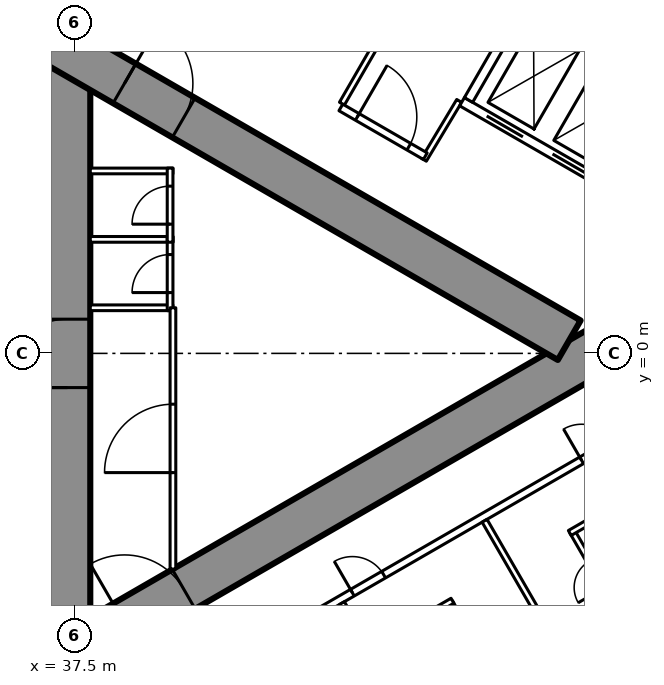
"""IFC4 building model, lengths in metres.
Left out: names, types, materials, properties, quantities, classifications, styles, units other than length and angle.
Written with IfcOpenShell. Run it as: python <this file> out.ifc"""

import sys

from ifc_helpers import new_model, si_unit, direction, frame, frame_2d, origin, place, context, subcontext, project, spatial, rectangle, extrude, element, fill, save


model = new_model("IFC4")
c1 = context("Model", 3, precision=1e-05, world=origin(), true_north=direction((0.0, 1.0)))
c2 = subcontext(c1, "Body", "Model", "MODEL_VIEW")
j1 = project(units=[si_unit("LENGTHUNIT", "METRE"), si_unit("PLANEANGLEUNIT", "RADIAN")], contexts=[c1])
p1 = place(None, origin())
s1 = spatial("IfcSite", under=j1, at=p1, CompositionType="ELEMENT")
p2 = place(p1, origin())
s2 = spatial("IfcBuilding", under=s1, at=p2, CompositionType="ELEMENT")
p3 = place(p2, frame((0.0, 0.0, 198.3)))
s3 = spatial("IfcBuildingStorey", under=s2, at=p3, CompositionType="ELEMENT", Elevation=198.3)
p4 = place(p3, frame((37.3, -8.6, 0.0), z_axis=(0.0, 0.0, 1.0), x_axis=(0.0, 1.0, 0.0)))
e1 = element("IfcWall", 1, at=p4, inside=s3, PredefinedType="SHEAR", context=c2, shape_type="SweptSolid", body=[
    extrude(rectangle(XDim=17.2, YDim=1.2, at=frame_2d((8.6, 0.0))), origin(), (0.0, 0.0, 1.0), 3.5),
])
p5 = place(p4, frame((7.7, 0.0, 0.0)))
e2 = element("IfcOpeningElement", 2, at=p5, cuts=e1, PredefinedType="OPENING", context=c2, shape_type="SweptSolid", body=[
    extrude(rectangle(XDim=1.8, YDim=2.2, at=frame_2d((0.9, 1.1))), frame((0.0, 0.61, 0.0), z_axis=(0.0, -1.0, 0.0), x_axis=(1.0, 0.0, 0.0)), (0.0, 0.0, 1.0), 1.22),
])
p6 = place(p3, frame((27.2, -13.8, 0.0), z_axis=(0.0, 0.0, 1.0), x_axis=(0.866027159892, 0.499996958321, 0.0)))
e3 = element("IfcWall", 3, at=p6, inside=s3, PredefinedType="SHEAR", context=c2, shape_type="SweptSolid", body=[
    extrude(rectangle(XDim=27.947, YDim=1.2, at=frame_2d((13.973, 0.0))), origin(), (0.0, 0.0, 1.0), 3.5),
])
p7 = place(p6, frame((4.6, 0.0, 0.0)))
e4 = element("IfcOpeningElement", 4, at=p7, cuts=e3, PredefinedType="OPENING", context=c2, shape_type="SweptSolid", body=[
    extrude(rectangle(XDim=1.0, YDim=2.2, at=frame_2d((0.5, 1.1))), frame((0.0, 0.61, 0.0), z_axis=(0.0, -1.0, 0.0), x_axis=(1.0, 0.0, 0.0)), (0.0, 0.0, 1.0), 1.22),
])
p8 = place(p6, frame((13.395, 0.0, 0.0)))
e5 = element("IfcOpeningElement", 5, at=p8, cuts=e3, PredefinedType="OPENING", context=c2, shape_type="SweptSolid", body=[
    extrude(rectangle(XDim=1.8, YDim=2.2, at=frame_2d((0.9, 1.1))), frame((0.0, 0.61, 0.0), z_axis=(0.0, -1.0, 0.0), x_axis=(1.0, 0.0, 0.0)), (0.0, 0.0, 1.0), 1.22),
])
p9 = place(p3, frame((27.2, 13.8, 0.0), z_axis=(0.0, 0.0, 1.0), x_axis=(0.866024515034, -0.500001539357, 0.0)))
e6 = element("IfcWall", 6, at=p9, inside=s3, PredefinedType="SHEAR", context=c2, shape_type="SweptSolid", body=[
    extrude(rectangle(XDim=26.907, YDim=1.2, at=frame_2d((13.454, 0.0))), origin(), (0.0, 0.0, 1.0), 3.5),
])
p10 = place(p9, frame((4.6, 0.0, 0.0)))
e7 = element("IfcOpeningElement", 7, at=p10, cuts=e6, PredefinedType="OPENING", context=c2, shape_type="SweptSolid", body=[
    extrude(rectangle(XDim=1.0, YDim=2.2, at=frame_2d((0.5, 1.1))), frame((0.0, 0.61, 0.0), z_axis=(0.0, -1.0, 0.0), x_axis=(1.0, 0.0, 0.0)), (0.0, 0.0, 1.0), 1.22),
])
p11 = place(p9, frame((13.395, 0.0, 0.0)))
e8 = element("IfcOpeningElement", 8, at=p11, cuts=e6, PredefinedType="OPENING", context=c2, shape_type="SweptSolid", body=[
    extrude(rectangle(XDim=1.8, YDim=2.2, at=frame_2d((0.9, 1.1))), frame((0.0, 0.61, 0.0), z_axis=(0.0, -1.0, 0.0), x_axis=(1.0, 0.0, 0.0)), (0.0, 0.0, 1.0), 1.22),
])
p12 = place(p3, frame((27.959, -16.017, 0.0), z_axis=(0.0, 0.0, 1.0), x_axis=(0.866024151371, 0.500002169237, 0.0)))
e9 = element("IfcWall", 9, at=p12, inside=s3, PredefinedType="PARTITIONING", context=c2, shape_type="SweptSolid", body=[
    extrude(rectangle(XDim=32.034, YDim=0.2, at=frame_2d((16.017, 0.0))), origin(), (0.0, 0.0, 1.0), 3.25),
])
p13 = place(p12, frame((0.6, 0.0, 0.0)))
e10 = element("IfcOpeningElement", 10, at=p13, cuts=e9, PredefinedType="OPENING", context=c2, shape_type="SweptSolid", body=[
    extrude(rectangle(XDim=0.95, YDim=2.2, at=frame_2d((0.475, 1.1))), frame((0.0, 0.11, 0.0), z_axis=(0.0, -1.0, 0.0), x_axis=(1.0, 0.0, 0.0)), (0.0, 0.0, 1.0), 0.22),
])
p14 = place(p12, frame((13.132, 0.0, 0.0)))
e11 = element("IfcOpeningElement", 11, at=p14, cuts=e9, PredefinedType="OPENING", context=c2, shape_type="SweptSolid", body=[
    extrude(rectangle(XDim=0.95, YDim=2.2, at=frame_2d((0.475, 1.1))), frame((0.0, 0.11, 0.0), z_axis=(0.0, -1.0, 0.0), x_axis=(1.0, 0.0, 0.0)), (0.0, 0.0, 1.0), 0.22),
])
p15 = place(p12, frame((15.391, 0.0, 0.0)))
e12 = element("IfcOpeningElement", 12, at=p15, cuts=e9, PredefinedType="OPENING", context=c2, shape_type="SweptSolid", body=[
    extrude(rectangle(XDim=0.95, YDim=2.2, at=frame_2d((0.475, 1.1))), frame((0.0, 0.11, 0.0), z_axis=(0.0, -1.0, 0.0), x_axis=(1.0, 0.0, 0.0)), (0.0, 0.0, 1.0), 0.22),
])
p16 = place(p12, frame((19.441, 0.0, 0.0)))
e13 = element("IfcOpeningElement", 13, at=p16, cuts=e9, PredefinedType="OPENING", context=c2, shape_type="SweptSolid", body=[
    extrude(rectangle(XDim=0.95, YDim=2.2, at=frame_2d((0.475, 1.1))), frame((0.0, 0.11, 0.0), z_axis=(0.0, -1.0, 0.0), x_axis=(1.0, 0.0, 0.0)), (0.0, 0.0, 1.0), 0.22),
])
p17 = place(p12, frame((26.406, 0.0, 0.0)))
e14 = element("IfcOpeningElement", 14, at=p17, cuts=e9, PredefinedType="OPENING", context=c2, shape_type="SweptSolid", body=[
    extrude(rectangle(XDim=0.95, YDim=2.2, at=frame_2d((0.475, 1.1))), frame((0.0, 0.11, 0.0), z_axis=(0.0, -1.0, 0.0), x_axis=(1.0, 0.0, 0.0)), (0.0, 0.0, 1.0), 0.22),
])
p18 = place(p12, frame((28.87, 0.0, 0.0)))
e15 = element("IfcOpeningElement", 15, at=p18, cuts=e9, PredefinedType="OPENING", context=c2, shape_type="SweptSolid", body=[
    extrude(rectangle(XDim=1.8, YDim=2.2, at=frame_2d((0.9, 1.1))), frame((0.0, 0.11, 0.0), z_axis=(0.0, -1.0, 0.0), x_axis=(1.0, 0.0, 0.0)), (0.0, 0.0, 1.0), 0.22),
])
p19 = place(p3, frame((44.521, -6.571, 0.0), z_axis=(0.0, 0.0, 1.0), x_axis=(0.500010457486, -0.866019366068, 0.0)))
e16 = element("IfcWall", 16, at=p19, inside=s3, PredefinedType="PARTITIONING", context=c2, shape_type="SweptSolid", body=[
    extrude(rectangle(XDim=10.126, YDim=0.15, at=frame_2d((5.063, 0.0))), origin(), (0.0, 0.0, 1.0), 3.25),
])
p20 = place(p3, frame((48.275, -4.404, 0.0), z_axis=(0.0, 0.0, 1.0), x_axis=(0.500006004368, -0.866021937133, 0.0)))
e17 = element("IfcWall", 17, at=p20, inside=s3, PredefinedType="PARTITIONING", context=c2, shape_type="SweptSolid", body=[
    extrude(rectangle(XDim=7.279, YDim=0.15, at=frame_2d((3.64, 0.0))), origin(), (0.0, 0.0, 1.0), 2.3),
])
p21 = place(p3, frame((44.521, 6.571, 0.0), z_axis=(0.0, 0.0, 1.0), x_axis=(0.500020376429, 0.866013639128, 0.0)))
e18 = element("IfcWall", 18, at=p21, inside=s3, PredefinedType="PARTITIONING", context=c2, shape_type="SweptSolid", body=[
    extrude(rectangle(XDim=7.306, YDim=0.15, at=frame_2d((3.653, 0.0))), origin(), (0.0, 0.0, 1.0), 2.3),
])
p22 = place(p3, frame((47.606, 6.643, 0.0), z_axis=(0.0, 0.0, 1.0), x_axis=(-0.514237157483, -0.857648031458, 0.0)))
e19 = element("IfcWall", 19, at=p22, inside=s3, PredefinedType="PARTITIONING", context=c2, shape_type="SweptSolid", body=[
    extrude(rectangle(XDim=1.805, YDim=0.15, at=frame_2d((0.902, 0.0))), origin(), (0.0, 0.0, 1.0), 3.25),
])
p23 = place(p3, frame((44.493, 6.472, 0.0), z_axis=(0.0, 0.0, 1.0), x_axis=(0.866027140358, -0.499996992154, 0.0)))
e20 = element("IfcWall", 20, at=p23, inside=s3, PredefinedType="PARTITIONING", context=c2, shape_type="SweptSolid", body=[
    extrude(rectangle(XDim=2.566, YDim=0.2, at=frame_2d((1.283, 0.0))), origin(), (0.0, 0.0, 1.0), 3.25),
])
p24 = place(p23, frame((0.5, 0.0, 0.0)))
e21 = element("IfcOpeningElement", 21, at=p24, cuts=e20, PredefinedType="OPENING", context=c2, shape_type="SweptSolid", body=[
    extrude(rectangle(XDim=1.566, YDim=2.2, at=frame_2d((0.783, 1.1))), frame((0.0, 0.11, 0.0), z_axis=(0.0, -1.0, 0.0), x_axis=(1.0, 0.0, 0.0)), (0.0, 0.0, 1.0), 0.22),
])
p25 = place(p3, frame((47.365, -6.546, 0.0), z_axis=(0.0, 0.0, 1.0), x_axis=(0.500006934395, -0.866021400173, 0.0)))
e22 = element("IfcWall", 22, at=p25, inside=s3, PredefinedType="PARTITIONING", context=c2, shape_type="SweptSolid", body=[
    extrude(rectangle(XDim=2.6, YDim=0.15, at=frame_2d((1.3, 0.0))), origin(), (0.0, 0.0, 1.0), 3.25),
])
p26 = place(p25, frame((0.9, 0.0, 0.0)))
e23 = element("IfcOpeningElement", 23, at=p26, cuts=e22, PredefinedType="OPENING", context=c2, shape_type="SweptSolid", body=[
    extrude(rectangle(XDim=0.8, YDim=2.2, at=frame_2d((0.4, 1.1))), frame((0.0, 0.085, 0.0), z_axis=(0.0, -1.0, 0.0), x_axis=(1.0, 0.0, 0.0)), (0.0, 0.0, 1.0), 0.17),
])
p27 = place(p3, frame((45.286, -7.746, 0.0), z_axis=(0.0, 0.0, 1.0), x_axis=(0.866006523861, 0.500032699561, 0.0)))
e24 = element("IfcWall", 24, at=p27, inside=s3, PredefinedType="PARTITIONING", context=c2, shape_type="SweptSolid", body=[
    extrude(rectangle(XDim=2.475, YDim=0.15, at=frame_2d((1.237, 0.0))), origin(), (0.0, 0.0, 1.0), 3.25),
])
p28 = place(p3, frame((50.582, -4.688, 0.0), z_axis=(0.0, 0.0, 1.0), x_axis=(0.500006934395, -0.866021400173, 0.0)))
e25 = element("IfcWall", 25, at=p28, inside=s3, PredefinedType="PARTITIONING", context=c2, shape_type="SweptSolid", body=[
    extrude(rectangle(XDim=2.6, YDim=0.15, at=frame_2d((1.3, 0.0))), origin(), (0.0, 0.0, 1.0), 3.25),
])
p29 = place(p28, frame((0.9, 0.0, 0.0)))
e26 = element("IfcOpeningElement", 26, at=p29, cuts=e25, PredefinedType="OPENING", context=c2, shape_type="SweptSolid", body=[
    extrude(rectangle(XDim=0.8, YDim=2.2, at=frame_2d((0.4, 1.1))), frame((0.0, 0.085, 0.0), z_axis=(0.0, -1.0, 0.0), x_axis=(1.0, 0.0, 0.0)), (0.0, 0.0, 1.0), 0.17),
])
p30 = place(p3, frame((50.517, -4.726, 0.0), z_axis=(0.0, 0.0, 1.0), x_axis=(0.866031185235, 0.4999899861, 0.0)))
e27 = element("IfcWall", 27, at=p30, inside=s3, PredefinedType="PARTITIONING", context=c2, shape_type="SweptSolid", body=[
    extrude(rectangle(XDim=2.475, YDim=0.15, at=frame_2d((1.238, 0.0))), origin(), (0.0, 0.0, 1.0), 3.25),
])
for number, where, z_axis, x_axis in (
    (28, (37.9, 1.2, 0.0), (0.0, 0.0, 1.0), (1.0, 0.0, 0.0)),
    (29, (37.9, 3.0, 0.0), (0.0, 0.0, 1.0), (1.0, 0.0, 0.0)),
    (30, (37.9, 4.8, 0.0), (0.0, 0.0, 1.0), (1.0, 0.0, 0.0)),
):
    element("IfcWall", number, at=place(p3, frame(where, z_axis=z_axis, x_axis=x_axis)), inside=s3, PredefinedType="PARTITIONING", context=c2, shape_type="SweptSolid", body=[
        extrude(rectangle(XDim=2.175, YDim=0.15, at=frame_2d((1.087, 0.0))), origin(), (0.0, 0.0, 1.0), 3.25),
    ])
p31 = place(p3, frame((40.0, 1.125, 0.0), z_axis=(0.0, 0.0, 1.0), x_axis=(0.0, 1.0, 0.0)))
e31 = element("IfcWall", 31, at=p31, inside=s3, PredefinedType="PARTITIONING", context=c2, shape_type="SweptSolid", body=[
    extrude(rectangle(XDim=1.95, YDim=0.15, at=frame_2d((0.975, 0.0))), origin(), (0.0, 0.0, 1.0), 3.25),
])
p32 = place(p31, frame((0.475, 0.0, 0.0)))
e32 = element("IfcOpeningElement", 32, at=p32, cuts=e31, PredefinedType="OPENING", context=c2, shape_type="SweptSolid", body=[
    extrude(rectangle(XDim=1.0, YDim=2.2, at=frame_2d((0.5, 1.1))), frame((0.0, 0.085, 0.0), z_axis=(0.0, -1.0, 0.0), x_axis=(1.0, 0.0, 0.0)), (0.0, 0.0, 1.0), 0.17),
])
p33 = place(p3, frame((40.0, 2.925, 0.0), z_axis=(0.0, 0.0, 1.0), x_axis=(0.0, 1.0, 0.0)))
e33 = element("IfcWall", 33, at=p33, inside=s3, PredefinedType="PARTITIONING", context=c2, shape_type="SweptSolid", body=[
    extrude(rectangle(XDim=1.95, YDim=0.15, at=frame_2d((0.975, 0.0))), origin(), (0.0, 0.0, 1.0), 3.25),
])
p34 = place(p33, frame((0.475, 0.0, 0.0)))
e34 = element("IfcOpeningElement", 34, at=p34, cuts=e33, PredefinedType="OPENING", context=c2, shape_type="SweptSolid", body=[
    extrude(rectangle(XDim=1.0, YDim=2.2, at=frame_2d((0.5, 1.1))), frame((0.0, 0.085, 0.0), z_axis=(0.0, -1.0, 0.0), x_axis=(1.0, 0.0, 0.0)), (0.0, 0.0, 1.0), 0.17),
])
p35 = place(p3, frame((40.075, -5.674, 0.0), z_axis=(0.0, 0.0, 1.0), x_axis=(0.0, 1.0, 0.0)))
e35 = element("IfcWall", 35, at=p35, inside=s3, PredefinedType="PARTITIONING", context=c2, shape_type="SweptSolid", body=[
    extrude(rectangle(XDim=6.874, YDim=0.15, at=frame_2d((3.437, 0.0))), origin(), (0.0, 0.0, 1.0), 3.25),
])
p36 = place(p35, frame((2.537, 0.0, 0.0)))
e36 = element("IfcOpeningElement", 36, at=p36, cuts=e35, PredefinedType="OPENING", context=c2, shape_type="SweptSolid", body=[
    extrude(rectangle(XDim=1.8, YDim=2.2, at=frame_2d((0.9, 1.1))), frame((0.0, 0.085, 0.0), z_axis=(0.0, -1.0, 0.0), x_axis=(1.0, 0.0, 0.0)), (0.0, 0.0, 1.0), 0.17),
])
p37 = place(p3, frame((47.681, 6.622, 0.0), z_axis=(0.0, 0.0, 1.0), x_axis=(0.86603344179, -0.499986077507, 0.0)))
e37 = element("IfcWall", 37, at=p37, inside=s3, PredefinedType="PARTITIONING", context=c2, shape_type="SweptSolid", body=[
    extrude(rectangle(XDim=6.6, YDim=0.25, at=frame_2d((3.3, 0.0))), origin(), (0.0, 0.0, 1.0), 3.25),
])
p38 = place(p37, frame((0.75, 0.0, 0.0)))
e38 = element("IfcOpeningElement", 38, at=p38, cuts=e37, PredefinedType="OPENING", context=c2, shape_type="SweptSolid", body=[
    extrude(rectangle(XDim=1.1, YDim=2.2, at=frame_2d((0.55, 1.1))), frame((0.0, 0.135, 0.0), z_axis=(0.0, -1.0, 0.0), x_axis=(1.0, 0.0, 0.0)), (0.0, 0.0, 1.0), 0.27),
])
p39 = place(p37, frame((2.75, 0.0, 0.0)))
e39 = element("IfcOpeningElement", 39, at=p39, cuts=e37, PredefinedType="OPENING", context=c2, shape_type="SweptSolid", body=[
    extrude(rectangle(XDim=1.1, YDim=2.2, at=frame_2d((0.55, 1.1))), frame((0.0, 0.135, 0.0), z_axis=(0.0, -1.0, 0.0), x_axis=(1.0, 0.0, 0.0)), (0.0, 0.0, 1.0), 0.27),
])
p40 = place(p37, frame((4.75, 0.0, 0.0)))
e40 = element("IfcOpeningElement", 40, at=p40, cuts=e37, PredefinedType="OPENING", context=c2, shape_type="SweptSolid", body=[
    extrude(rectangle(XDim=1.1, YDim=2.2, at=frame_2d((0.55, 1.1))), frame((0.0, 0.135, 0.0), z_axis=(0.0, -1.0, 0.0), x_axis=(1.0, 0.0, 0.0)), (0.0, 0.0, 1.0), 0.27),
])
p41 = place(p3, frame((49.406, 9.611, 0.0), z_axis=(0.0, 0.0, 1.0), x_axis=(0.86603344179, -0.499986077507, 0.0)))
e41 = element("IfcWall", 41, at=p41, inside=s3, PredefinedType="PARTITIONING", context=c2, shape_type="SweptSolid", body=[
    extrude(rectangle(XDim=6.6, YDim=0.25, at=frame_2d((3.3, 0.0))), origin(), (0.0, 0.0, 1.0), 3.25),
])
p42 = place(p3, frame((47.852, 6.668, 0.0), z_axis=(0.0, 0.0, 1.0), x_axis=(0.499929347863, 0.866066190972, 0.0)))
e42 = element("IfcWall", 42, at=p42, inside=s3, PredefinedType="PARTITIONING", context=c2, shape_type="SweptSolid", body=[
    extrude(rectangle(XDim=3.201, YDim=0.25, at=frame_2d((1.6, 0.0))), origin(), (0.0, 0.0, 1.0), 3.25),
])
p43 = place(p16, origin())
e43 = element("IfcDoor", 43, at=p43, inside=s3, OperationType="SINGLE_SWING_LEFT", PredefinedType="DOOR", context=c2, shape_type="SweptSolid", body=[
    extrude(rectangle(XDim=0.95, YDim=2.2, at=frame_2d((0.475, 1.1))), frame((0.0, 0.025, 0.0), z_axis=(0.0, -1.0, 0.0), x_axis=(1.0, 0.0, 0.0)), (0.0, 0.0, 1.0), 0.05),
])
fill(e13, e43)
p44 = place(p17, origin())
e44 = element("IfcDoor", 44, at=p44, inside=s3, OperationType="SINGLE_SWING_LEFT", PredefinedType="DOOR", context=c2, shape_type="SweptSolid", body=[
    extrude(rectangle(XDim=0.95, YDim=2.2, at=frame_2d((0.475, 1.1))), frame((0.0, 0.025, 0.0), z_axis=(0.0, -1.0, 0.0), x_axis=(1.0, 0.0, 0.0)), (0.0, 0.0, 1.0), 0.05),
])
fill(e14, e44)
p45 = place(p24, origin())
e45 = element("IfcDoor", 45, at=p45, inside=s3, OperationType="SINGLE_SWING_LEFT", PredefinedType="DOOR", context=c2, shape_type="SweptSolid", body=[
    extrude(rectangle(XDim=1.566, YDim=2.2, at=frame_2d((0.783, 1.1))), frame((0.0, 0.025, 0.0), z_axis=(0.0, -1.0, 0.0), x_axis=(1.0, 0.0, 0.0)), (0.0, 0.0, 1.0), 0.05),
])
fill(e21, e45)
p46 = place(p32, origin())
e46 = element("IfcDoor", 46, at=p46, inside=s3, OperationType="SINGLE_SWING_LEFT", PredefinedType="DOOR", context=c2, shape_type="SweptSolid", body=[
    extrude(rectangle(XDim=1.0, YDim=2.2, at=frame_2d((0.5, 1.1))), frame((0.0, 0.025, 0.0), z_axis=(0.0, -1.0, 0.0), x_axis=(1.0, 0.0, 0.0)), (0.0, 0.0, 1.0), 0.05),
])
fill(e32, e46)
p47 = place(p34, origin())
e47 = element("IfcDoor", 47, at=p47, inside=s3, OperationType="SINGLE_SWING_LEFT", PredefinedType="DOOR", context=c2, shape_type="SweptSolid", body=[
    extrude(rectangle(XDim=1.0, YDim=2.2, at=frame_2d((0.5, 1.1))), frame((0.0, 0.025, 0.0), z_axis=(0.0, -1.0, 0.0), x_axis=(1.0, 0.0, 0.0)), (0.0, 0.0, 1.0), 0.05),
])
fill(e34, e47)
p48 = place(p36, origin())
e48 = element("IfcDoor", 48, at=p48, inside=s3, OperationType="DOUBLE_DOOR_SINGLE_SWING", PredefinedType="DOOR", context=c2, shape_type="SweptSolid", body=[
    extrude(rectangle(XDim=1.8, YDim=2.2, at=frame_2d((0.9, 1.1))), frame((0.0, 0.025, 0.0), z_axis=(0.0, -1.0, 0.0), x_axis=(1.0, 0.0, 0.0)), (0.0, 0.0, 1.0), 0.05),
])
fill(e36, e48)
p49 = place(p8, origin())
e49 = element("IfcDoor", 49, at=p49, inside=s3, OperationType="DOUBLE_DOOR_SINGLE_SWING", PredefinedType="DOOR", context=c2, shape_type="SweptSolid", body=[
    extrude(rectangle(XDim=1.8, YDim=2.2, at=frame_2d((0.9, 1.1))), frame((0.0, 0.025, 0.0), z_axis=(0.0, -1.0, 0.0), x_axis=(1.0, 0.0, 0.0)), (0.0, 0.0, 1.0), 0.05),
])
fill(e5, e49)
p50 = place(p11, origin())
e50 = element("IfcDoor", 50, at=p50, inside=s3, OperationType="DOUBLE_DOOR_SINGLE_SWING", PredefinedType="DOOR", context=c2, shape_type="SweptSolid", body=[
    extrude(rectangle(XDim=1.8, YDim=2.2, at=frame_2d((0.9, 1.1))), frame((0.0, 0.025, 0.0), z_axis=(0.0, -1.0, 0.0), x_axis=(1.0, 0.0, 0.0)), (0.0, 0.0, 1.0), 0.05),
])
fill(e8, e50)
p51 = place(p5, origin())
e51 = element("IfcDoor", 51, at=p51, inside=s3, OperationType="DOUBLE_DOOR_SINGLE_SWING", PredefinedType="DOOR", context=c2, shape_type="SweptSolid", body=[
    extrude(rectangle(XDim=1.8, YDim=2.2, at=frame_2d((0.9, 1.1))), frame((0.0, 0.025, 0.0), z_axis=(0.0, -1.0, 0.0), x_axis=(1.0, 0.0, 0.0)), (0.0, 0.0, 1.0), 0.05),
])
fill(e2, e51)
p52 = place(p38, origin())
e52 = element("IfcDoor", 52, at=p52, inside=s3, OperationType="DOUBLE_DOOR_SLIDING", PredefinedType="USERDEFINED", context=c2, shape_type="SweptSolid", body=[
    extrude(rectangle(XDim=1.1, YDim=2.2, at=frame_2d((0.55, 1.1))), frame((0.0, 0.025, 0.0), z_axis=(0.0, -1.0, 0.0), x_axis=(1.0, 0.0, 0.0)), (0.0, 0.0, 1.0), 0.05),
])
fill(e38, e52)
p53 = place(p39, origin())
e53 = element("IfcDoor", 53, at=p53, inside=s3, OperationType="DOUBLE_DOOR_SLIDING", PredefinedType="USERDEFINED", context=c2, shape_type="SweptSolid", body=[
    extrude(rectangle(XDim=1.1, YDim=2.2, at=frame_2d((0.55, 1.1))), frame((0.0, 0.025, 0.0), z_axis=(0.0, -1.0, 0.0), x_axis=(1.0, 0.0, 0.0)), (0.0, 0.0, 1.0), 0.05),
])
fill(e39, e53)
save(model, sys.argv[1])
